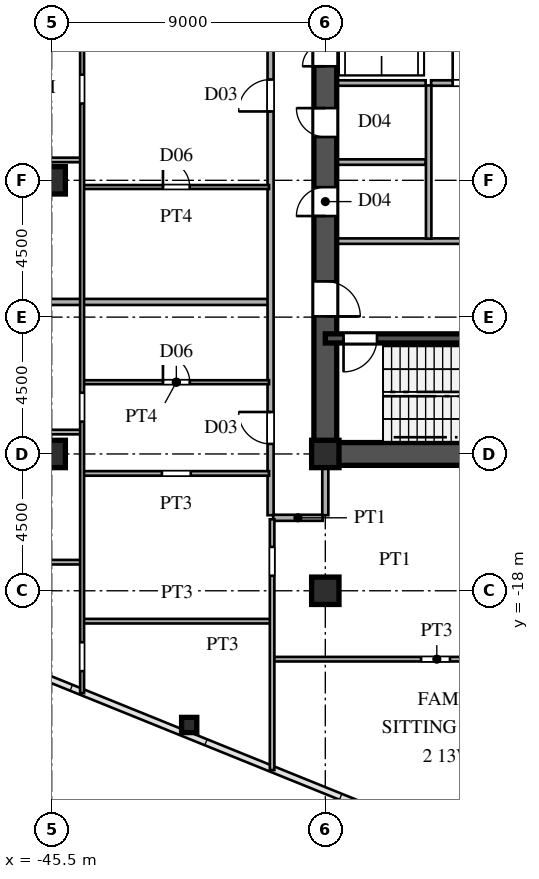
"""IFC4 building model, lengths in metres.
Left out: names, types, materials, properties, quantities, classifications, styles, units other than length and angle.
Written with IfcOpenShell. Run it as: python <this file> out.ifc"""

import sys

from ifc_helpers import new_model, si_unit, direction, frame, frame_2d, origin, origin_2d, place, context, subcontext, project, spatial, rectangle, hollow_rectangle, i_section, extrude, source, transform, mapped, element, fill, save


model = new_model("IFC4")
c1 = context("Model", 3, precision=1e-05, world=origin(), true_north=direction((0.0, 1.0)))
c2 = subcontext(c1, "Body", "Model", "MODEL_VIEW")
j1 = project(units=[si_unit("LENGTHUNIT", "METRE"), si_unit("PLANEANGLEUNIT", "RADIAN")], contexts=[c1])
p1 = place(None, origin())
s1 = spatial("IfcSite", under=j1, at=p1, CompositionType="ELEMENT")
p2 = place(p1, origin())
s2 = spatial("IfcBuilding", under=s1, at=p2, CompositionType="ELEMENT")
p3 = place(p2, frame((0.0, 0.0, 51.3)))
s3 = spatial("IfcBuildingStorey", under=s2, at=p3, CompositionType="ELEMENT", Elevation=51.3)
m1 = source(origin(), c2, "Body", "SweptSolid", [
    extrude(i_section(OverallWidth=0.9, OverallDepth=0.9, WebThickness=0.036, FlangeThickness=0.055, at=origin_2d()), origin(), (0.0, 0.0, 1.0), 3.6),
])
for number, where, z_axis, x_axis in (
    (1, (-36.5, -18.0, 0.0), (0.0, 0.0, 1.0), (1.0, 0.0, 0.0)),
    (2, (-36.5, -13.5, 0.0), (0.0, 0.0, 1.0), (1.0, 0.0, 0.0)),
    (3, (-45.5, -13.5, 0.0), (0.0, 0.0, 1.0), (1.0, 0.0, 0.0)),
    (4, (-45.5, -4.5, 0.0), (0.0, 0.0, 1.0), (1.0, 0.0, 0.0)),
):
    element("IfcColumn", number, at=place(p3, frame(where, z_axis=z_axis, x_axis=x_axis)), inside=s3, PredefinedType="COLUMN", context=c2, shape_type="MappedRepresentation", body=[
        mapped(m1, transform((0.0, 0.0, 0.0), scale=1.0)),
    ])
m2 = source(origin(), c2, "Body", "SweptSolid", [
    extrude(hollow_rectangle(XDim=0.5, YDim=0.5, WallThickness=0.02, at=origin_2d()), origin(), (0.0, 0.0, 1.0), 3.6),
])
p4 = place(p3, frame((-40.977, -22.414, 0.0), z_axis=(0.0, 0.0, 1.0), x_axis=(1.0, 0.0, 0.0)))
e5 = element("IfcColumn", 5, at=p4, inside=s3, PredefinedType="COLUMN", context=c2, shape_type="MappedRepresentation", body=[
    mapped(m2, transform((0.0, 0.0, 0.0), scale=1.0)),
])
p5 = place(p3, frame((-36.5, -13.5, 0.0), z_axis=(0.0, 0.0, 1.0), x_axis=(1.0, 0.0, 0.0)))
e6 = element("IfcWall", 6, at=p5, inside=s3, PredefinedType="SHEAR", context=c2, shape_type="SweptSolid", body=[
    extrude(rectangle(XDim=9.0, YDim=0.75, at=frame_2d((4.5, 0.0))), origin(), (0.0, 0.0, 1.0), 3.38),
])
p6 = place(p3, frame((-36.5, -13.65, 0.0), z_axis=(0.0, 0.0, 1.0), x_axis=(0.0, 1.0, 0.0)))
e7 = element("IfcWall", 7, at=p6, inside=s3, PredefinedType="SHEAR", context=c2, shape_type="SweptSolid", body=[
    extrude(rectangle(XDim=7.15, YDim=0.75, at=frame_2d((3.575, 0.0))), origin(), (0.0, 0.0, 1.0), 3.38),
])
p7 = place(p6, frame((4.675, 0.0, 0.0)))
e8 = element("IfcOpeningElement", 8, at=p7, cuts=e7, PredefinedType="OPENING", context=c2, shape_type="SweptSolid", body=[
    extrude(rectangle(XDim=1.15, YDim=2.2, at=frame_2d((0.575, 1.1))), frame((0.0, 0.385, 0.0), z_axis=(0.0, -1.0, 0.0), x_axis=(1.0, 0.0, 0.0)), (0.0, 0.0, 1.0), 0.77),
])
p8 = place(p3, frame((-36.5, -1.3, 0.0), z_axis=(0.0, 0.0, 1.0), x_axis=(0.0, 1.0, 0.0)))
e9 = element("IfcWall", 9, at=p8, inside=s3, PredefinedType="SHEAR", context=c2, shape_type="SweptSolid", body=[
    extrude(rectangle(XDim=2.6, YDim=0.75, at=frame_2d((1.3, 0.0))), origin(), (0.0, 0.0, 1.0), 3.38),
])
p9 = place(p8, frame((0.55, 0.0, 0.0)))
e10 = element("IfcOpeningElement", 10, at=p9, cuts=e9, PredefinedType="OPENING", context=c2, shape_type="SweptSolid", body=[
    extrude(rectangle(XDim=1.5, YDim=2.3, at=frame_2d((0.75, 1.15))), frame((0.0, 0.385, 0.0), z_axis=(0.0, -1.0, 0.0), x_axis=(1.0, 0.0, 0.0)), (0.0, 0.0, 1.0), 0.77),
])
p10 = place(p3, frame((-36.5, -6.5, 0.0), z_axis=(0.0, 0.0, 1.0), x_axis=(0.0, 1.0, 0.0)))
e11 = element("IfcWall", 11, at=p10, inside=s3, PredefinedType="SHEAR", context=c2, shape_type="SweptSolid", body=[
    extrude(rectangle(XDim=2.6, YDim=0.75, at=frame_2d((1.3, 0.0))), origin(), (0.0, 0.0, 1.0), 3.38),
])
p11 = place(p10, frame((0.825, 0.0, 0.0)))
e12 = element("IfcOpeningElement", 12, at=p11, cuts=e11, PredefinedType="OPENING", context=c2, shape_type="SweptSolid", body=[
    extrude(rectangle(XDim=0.95, YDim=2.15, at=frame_2d((0.475, 1.075))), frame((0.0, 0.385, 0.0), z_axis=(0.0, -1.0, 0.0), x_axis=(1.0, 0.0, 0.0)), (0.0, 0.0, 1.0), 0.77),
])
p12 = place(p3, frame((-36.5, -3.9, 0.0), z_axis=(0.0, 0.0, 1.0), x_axis=(0.0, 1.0, 0.0)))
e13 = element("IfcWall", 13, at=p12, inside=s3, PredefinedType="SHEAR", context=c2, shape_type="SweptSolid", body=[
    extrude(rectangle(XDim=2.6, YDim=0.75, at=frame_2d((1.3, 0.0))), origin(), (0.0, 0.0, 1.0), 3.38),
])
p13 = place(p12, frame((0.825, 0.0, 0.0)))
e14 = element("IfcOpeningElement", 14, at=p13, cuts=e13, PredefinedType="OPENING", context=c2, shape_type="SweptSolid", body=[
    extrude(rectangle(XDim=0.95, YDim=2.15, at=frame_2d((0.475, 1.075))), frame((0.0, 0.385, 0.0), z_axis=(0.0, -1.0, 0.0), x_axis=(1.0, 0.0, 0.0)), (0.0, 0.0, 1.0), 0.77),
])
p14 = place(p3, frame((-36.5, -9.7, 0.0), z_axis=(0.0, 0.0, 1.0), x_axis=(1.0, 0.0, 0.0)))
e15 = element("IfcWall", 15, at=p14, inside=s3, PredefinedType="SHEAR", context=c2, shape_type="SweptSolid", body=[
    extrude(rectangle(XDim=9.0, YDim=0.3, at=frame_2d((4.5, 0.0))), origin(), (0.0, 0.0, 1.0), 3.38),
])
p15 = place(p14, frame((0.6, 0.0, 0.0)))
e16 = element("IfcOpeningElement", 16, at=p15, cuts=e15, PredefinedType="OPENING", context=c2, shape_type="SweptSolid", body=[
    extrude(rectangle(XDim=1.1, YDim=2.2, at=frame_2d((0.55, 1.1))), frame((0.0, 0.16, 0.0), z_axis=(0.0, -1.0, 0.0), x_axis=(1.0, 0.0, 0.0)), (0.0, 0.0, 1.0), 0.32),
])
p16 = place(p3, frame((-36.15, -6.5, 0.0), z_axis=(0.0, 0.0, 1.0), x_axis=(1.0, 0.0, 0.0)))
e17 = element("IfcWall", 17, at=p16, inside=s3, PredefinedType="PARTITIONING", context=c2, shape_type="SweptSolid", body=[
    extrude(rectangle(XDim=5.7, YDim=0.18, at=frame_2d((2.85, 0.0))), origin(), (0.0, 0.0, 1.0), 3.38),
])
p17 = place(p3, frame((-33.1, -6.42, 0.0), z_axis=(0.0, 0.0, 1.0), x_axis=(0.0, 1.0, 0.0)))
e18 = element("IfcWall", 18, at=p17, inside=s3, PredefinedType="PARTITIONING", context=c2, shape_type="SweptSolid", body=[
    extrude(rectangle(XDim=5.04, YDim=0.18, at=frame_2d((2.52, 0.0))), origin(), (0.0, 0.0, 1.0), 3.38),
])
p18 = place(p3, frame((-33.02, -1.3, 0.0), z_axis=(0.0, 0.0, 1.0), x_axis=(1.0, 0.0, 0.0)))
e19 = element("IfcWall", 19, at=p18, inside=s3, PredefinedType="PARTITIONING", context=c2, shape_type="SweptSolid", body=[
    extrude(rectangle(XDim=2.57, YDim=0.18, at=frame_2d((1.285, 0.0))), origin(), (0.0, 0.0, 1.0), 3.38),
])
p19 = place(p18, frame((0.71, 0.0, 0.0)))
e20 = element("IfcOpeningElement", 20, at=p19, cuts=e19, PredefinedType="OPENING", context=c2, shape_type="SweptSolid", body=[
    extrude(rectangle(XDim=1.15, YDim=2.2, at=frame_2d((0.575, 1.1))), frame((0.0, 0.1, 0.0), z_axis=(0.0, -1.0, 0.0), x_axis=(1.0, 0.0, 0.0)), (0.0, 0.0, 1.0), 0.2),
])
for number, where, z_axis, x_axis in (
    (21, (-36.15, -1.3, 0.0), (0.0, 0.0, 1.0), (1.0, 0.0, 0.0)),
    (22, (-36.15, -3.9, 0.0), (0.0, 0.0, 1.0), (1.0, 0.0, 0.0)),
):
    element("IfcWall", number, at=place(p3, frame(where, z_axis=z_axis, x_axis=x_axis)), inside=s3, PredefinedType="PARTITIONING", context=c2, shape_type="SweptSolid", body=[
        extrude(rectangle(XDim=2.95, YDim=0.18, at=frame_2d((1.475, 0.0))), origin(), (0.0, 0.0, 1.0), 3.38),
    ])
p20 = place(p3, frame((-38.2, -20.25, 0.0), z_axis=(0.0, 0.0, 1.0), x_axis=(1.0, 0.0, 0.0)))
e23 = element("IfcWall", 23, at=p20, inside=s3, PredefinedType="PARTITIONING", context=c2, shape_type="SweptSolid", body=[
    extrude(rectangle(XDim=10.735, YDim=0.15, at=frame_2d((5.367, 0.0))), origin(), (0.0, 0.0, 1.0), 3.38),
])
p21 = place(p20, frame((4.85, 0.0, 0.0)))
e24 = element("IfcOpeningElement", 24, at=p21, cuts=e23, PredefinedType="OPENING", context=c2, shape_type="SweptSolid", body=[
    extrude(rectangle(XDim=0.95, YDim=2.15, at=frame_2d((0.475, 1.075))), frame((0.0, 0.085, 0.0), z_axis=(0.0, -1.0, 0.0), x_axis=(1.0, 0.0, 0.0)), (0.0, 0.0, 1.0), 0.17),
])
p22 = place(p3, frame((-44.45, -19.0, 0.0), z_axis=(0.0, 0.0, 1.0), x_axis=(1.0, 0.0, 0.0)))
e25 = element("IfcWall", 25, at=p22, inside=s3, PredefinedType="PARTITIONING", context=c2, shape_type="SweptSolid", body=[
    extrude(rectangle(XDim=6.15, YDim=0.15, at=frame_2d((3.075, 0.0))), origin(), (0.0, 0.0, 1.0), 3.38),
])
p23 = place(p3, frame((-54.45, -17.06, 0.0), z_axis=(0.0, 0.0, 1.0), x_axis=(1.0, 0.0, 0.0)))
e26 = element("IfcWall", 26, at=p23, inside=s3, PredefinedType="PARTITIONING", context=c2, shape_type="SweptSolid", body=[
    extrude(rectangle(XDim=9.9, YDim=0.15, at=frame_2d((4.95, 0.0))), origin(), (0.0, 0.0, 1.0), 3.38),
])
p24 = place(p23, frame((4.475, 0.0, 0.0)))
e27 = element("IfcOpeningElement", 27, at=p24, cuts=e26, PredefinedType="OPENING", context=c2, shape_type="SweptSolid", body=[
    extrude(rectangle(XDim=0.95, YDim=2.15, at=frame_2d((0.475, 1.075))), frame((0.0, 0.085, 0.0), z_axis=(0.0, -1.0, 0.0), x_axis=(1.0, 0.0, 0.0)), (0.0, 0.0, 1.0), 0.17),
])
p25 = place(p3, frame((-38.215, -15.6, 0.0), z_axis=(0.0, 0.0, 1.0), x_axis=(1.0, 0.0, 0.0)))
e28 = element("IfcWall", 28, at=p25, inside=s3, PredefinedType="PARTITIONING", context=c2, shape_type="SweptSolid", body=[
    extrude(rectangle(XDim=1.63, YDim=0.2, at=frame_2d((0.815, 0.0))), origin(), (0.0, 0.0, 1.0), 3.38),
])
p26 = place(p3, frame((-44.45, -14.14, 0.0), z_axis=(0.0, 0.0, 1.0), x_axis=(1.0, 0.0, 0.0)))
e29 = element("IfcWall", 29, at=p26, inside=s3, PredefinedType="PARTITIONING", context=c2, shape_type="SweptSolid", body=[
    extrude(rectangle(XDim=6.1, YDim=0.15, at=frame_2d((3.05, 0.0))), origin(), (0.0, 0.0, 1.0), 3.38),
])
p27 = place(p26, frame((2.575, 0.0, 0.0)))
e30 = element("IfcOpeningElement", 30, at=p27, cuts=e29, PredefinedType="OPENING", context=c2, shape_type="SweptSolid", body=[
    extrude(rectangle(XDim=0.95, YDim=2.15, at=frame_2d((0.475, 1.075))), frame((0.0, 0.085, 0.0), z_axis=(0.0, -1.0, 0.0), x_axis=(1.0, 0.0, 0.0)), (0.0, 0.0, 1.0), 0.17),
])
p28 = place(p3, frame((-65.672, -12.78, 0.0), z_axis=(0.0, 0.0, 1.0), x_axis=(1.0, 0.0, 0.0)))
e31 = element("IfcWall", 31, at=p28, inside=s3, PredefinedType="PARTITIONING", context=c2, shape_type="SweptSolid", body=[
    extrude(rectangle(XDim=21.122, YDim=0.15, at=frame_2d((10.561, 0.0))), origin(), (0.0, 0.0, 1.0), 3.38),
])
p29 = place(p28, frame((15.697, 0.0, 0.0)))
e32 = element("IfcOpeningElement", 32, at=p29, cuts=e31, PredefinedType="OPENING", context=c2, shape_type="SweptSolid", body=[
    extrude(rectangle(XDim=0.95, YDim=2.15, at=frame_2d((0.475, 1.075))), frame((0.0, 0.085, 0.0), z_axis=(0.0, -1.0, 0.0), x_axis=(1.0, 0.0, 0.0)), (0.0, 0.0, 1.0), 0.17),
])
p30 = place(p28, frame((7.847, 0.0, 0.0)))
e33 = element("IfcOpeningElement", 33, at=p30, cuts=e31, PredefinedType="OPENING", context=c2, shape_type="SweptSolid", body=[
    extrude(rectangle(XDim=0.95, YDim=2.15, at=frame_2d((0.475, 1.075))), frame((0.0, 0.085, 0.0), z_axis=(0.0, -1.0, 0.0), x_axis=(1.0, 0.0, 0.0)), (0.0, 0.0, 1.0), 0.17),
])
p31 = place(p3, frame((-44.45, -11.14, 0.0), z_axis=(0.0, 0.0, 1.0), x_axis=(1.0, 0.0, 0.0)))
e34 = element("IfcWall", 34, at=p31, inside=s3, PredefinedType="PARTITIONING", context=c2, shape_type="SweptSolid", body=[
    extrude(rectangle(XDim=6.1, YDim=0.13, at=frame_2d((3.05, 0.0))), origin(), (0.0, 0.0, 1.0), 3.38),
])
p32 = place(p31, frame((2.61, 0.0, 0.0)))
e35 = element("IfcOpeningElement", 35, at=p32, cuts=e34, PredefinedType="OPENING", context=c2, shape_type="SweptSolid", body=[
    extrude(rectangle(XDim=0.88, YDim=2.1, at=frame_2d((0.44, 1.05))), frame((0.0, 0.075, 0.0), z_axis=(0.0, -1.0, 0.0), x_axis=(1.0, 0.0, 0.0)), (0.0, 0.0, 1.0), 0.15),
])
p33 = place(p3, frame((-72.505, -8.5, 0.0), z_axis=(0.0, 0.0, 1.0), x_axis=(1.0, 0.0, 0.0)))
e36 = element("IfcWall", 36, at=p33, inside=s3, PredefinedType="PARTITIONING", context=c2, shape_type="SweptSolid", body=[
    extrude(rectangle(XDim=34.125, YDim=0.2, at=frame_2d((17.062, 0.0))), origin(), (0.0, 0.0, 1.0), 3.38),
])
p34 = place(p3, frame((-44.45, -4.72, 0.0), z_axis=(0.0, 0.0, 1.0), x_axis=(1.0, 0.0, 0.0)))
e37 = element("IfcWall", 37, at=p34, inside=s3, PredefinedType="PARTITIONING", context=c2, shape_type="SweptSolid", body=[
    extrude(rectangle(XDim=6.1, YDim=0.13, at=frame_2d((3.05, 0.0))), origin(), (0.0, 0.0, 1.0), 3.38),
])
p35 = place(p34, frame((2.61, 0.0, 0.0)))
e38 = element("IfcOpeningElement", 38, at=p35, cuts=e37, PredefinedType="OPENING", context=c2, shape_type="SweptSolid", body=[
    extrude(rectangle(XDim=0.88, YDim=2.1, at=frame_2d((0.44, 1.05))), frame((0.0, 0.075, 0.0), z_axis=(0.0, -1.0, 0.0), x_axis=(1.0, 0.0, 0.0)), (0.0, 0.0, 1.0), 0.15),
])
p36 = place(p3, frame((-72.535, -3.83, 0.0), z_axis=(0.0, 0.0, 1.0), x_axis=(1.0, 0.0, 0.0)))
e39 = element("IfcWall", 39, at=p36, inside=s3, PredefinedType="PARTITIONING", context=c2, shape_type="SweptSolid", body=[
    extrude(rectangle(XDim=27.985, YDim=0.15, at=frame_2d((13.992, 0.0))), origin(), (0.0, 0.0, 1.0), 3.38),
])
p37 = place(p36, frame((22.56, 0.0, 0.0)))
e40 = element("IfcOpeningElement", 40, at=p37, cuts=e39, PredefinedType="OPENING", context=c2, shape_type="SweptSolid", body=[
    extrude(rectangle(XDim=0.95, YDim=2.15, at=frame_2d((0.475, 1.075))), frame((0.0, 0.085, 0.0), z_axis=(0.0, -1.0, 0.0), x_axis=(1.0, 0.0, 0.0)), (0.0, 0.0, 1.0), 0.17),
])
p38 = place(p36, frame((14.71, 0.0, 0.0)))
e41 = element("IfcOpeningElement", 41, at=p38, cuts=e39, PredefinedType="OPENING", context=c2, shape_type="SweptSolid", body=[
    extrude(rectangle(XDim=0.95, YDim=2.15, at=frame_2d((0.475, 1.075))), frame((0.0, 0.085, 0.0), z_axis=(0.0, -1.0, 0.0), x_axis=(1.0, 0.0, 0.0)), (0.0, 0.0, 1.0), 0.17),
])
p39 = place(p3, frame((-44.5, -21.368, 0.0), z_axis=(0.0, 0.0, 1.0), x_axis=(0.0, 1.0, 0.0)))
e42 = element("IfcWall", 42, at=p39, inside=s3, PredefinedType="PARTITIONING", context=c2, shape_type="SweptSolid", body=[
    extrude(rectangle(XDim=22.151, YDim=0.13, at=frame_2d((11.075, 0.0))), origin(), (0.0, 0.0, 1.0), 3.38),
])
p40 = place(p39, frame((8.932, 0.0, 0.0)))
e43 = element("IfcOpeningElement", 43, at=p40, cuts=e42, PredefinedType="OPENING", context=c2, shape_type="SweptSolid", body=[
    extrude(rectangle(XDim=0.95, YDim=2.15, at=frame_2d((0.475, 1.075))), frame((0.0, 0.075, 0.0), z_axis=(0.0, -1.0, 0.0), x_axis=(1.0, 0.0, 0.0)), (0.0, 0.0, 1.0), 0.15),
])
p41 = place(p39, frame((0.724, 0.0, 0.0)))
e44 = element("IfcOpeningElement", 44, at=p41, cuts=e42, PredefinedType="OPENING", context=c2, shape_type="SweptSolid", body=[
    extrude(rectangle(XDim=0.95, YDim=2.15, at=frame_2d((0.475, 1.075))), frame((0.0, 0.075, 0.0), z_axis=(0.0, -1.0, 0.0), x_axis=(1.0, 0.0, 0.0)), (0.0, 0.0, 1.0), 0.15),
])
p42 = place(p39, frame((19.393, 0.0, 0.0)))
e45 = element("IfcOpeningElement", 45, at=p42, cuts=e42, PredefinedType="OPENING", context=c2, shape_type="SweptSolid", body=[
    extrude(rectangle(XDim=0.95, YDim=2.15, at=frame_2d((0.475, 1.075))), frame((0.0, 0.075, 0.0), z_axis=(0.0, -1.0, 0.0), x_axis=(1.0, 0.0, 0.0)), (0.0, 0.0, 1.0), 0.15),
])
p43 = place(p3, frame((-38.3, -15.515, 0.0), z_axis=(0.0, 0.0, 1.0), x_axis=(0.0, 1.0, 0.0)))
e46 = element("IfcWall", 46, at=p43, inside=s3, PredefinedType="PARTITIONING", context=c2, shape_type="SweptSolid", body=[
    extrude(rectangle(XDim=31.03, YDim=0.2, at=frame_2d((15.515, 0.0))), origin(), (0.0, 0.0, 1.0), 3.38),
])
p44 = place(p43, frame((2.345, 0.0, 0.0)))
e47 = element("IfcOpeningElement", 47, at=p44, cuts=e46, PredefinedType="OPENING", context=c2, shape_type="SweptSolid", body=[
    extrude(rectangle(XDim=1.05, YDim=2.25, at=frame_2d((0.525, 1.125))), frame((0.0, 0.11, 0.0), z_axis=(0.0, -1.0, 0.0), x_axis=(1.0, 0.0, 0.0)), (0.0, 0.0, 1.0), 0.22),
])
p45 = place(p43, frame((13.28, 0.0, 0.0)))
e48 = element("IfcOpeningElement", 48, at=p45, cuts=e46, PredefinedType="OPENING", context=c2, shape_type="SweptSolid", body=[
    extrude(rectangle(XDim=1.05, YDim=2.25, at=frame_2d((0.525, 1.125))), frame((0.0, 0.11, 0.0), z_axis=(0.0, -1.0, 0.0), x_axis=(1.0, 0.0, 0.0)), (0.0, 0.0, 1.0), 0.22),
])
p46 = place(p43, frame((25.567, 0.0, 0.0)))
e49 = element("IfcOpeningElement", 49, at=p46, cuts=e46, PredefinedType="OPENING", context=c2, shape_type="SweptSolid", body=[
    extrude(rectangle(XDim=1.05, YDim=2.25, at=frame_2d((0.525, 1.125))), frame((0.0, 0.11, 0.0), z_axis=(0.0, -1.0, 0.0), x_axis=(1.0, 0.0, 0.0)), (0.0, 0.0, 1.0), 0.22),
])
p47 = place(p3, frame((-38.25, -23.898, 0.0), z_axis=(0.0, 0.0, 1.0), x_axis=(0.0, 1.0, 0.0)))
e50 = element("IfcWall", 50, at=p47, inside=s3, PredefinedType="PARTITIONING", context=c2, shape_type="SweptSolid", body=[
    extrude(rectangle(XDim=8.248, YDim=0.15, at=frame_2d((4.124, 0.0))), origin(), (0.0, 0.0, 1.0), 3.38),
])
p48 = place(p47, frame((6.391, 0.0, 0.0)))
e51 = element("IfcOpeningElement", 51, at=p48, cuts=e50, PredefinedType="OPENING", context=c2, shape_type="SweptSolid", body=[
    extrude(rectangle(XDim=0.95, YDim=2.15, at=frame_2d((0.475, 1.075))), frame((0.0, 0.085, 0.0), z_axis=(0.0, -1.0, 0.0), x_axis=(1.0, 0.0, 0.0)), (0.0, 0.0, 1.0), 0.17),
])
p49 = place(p3, frame((-36.5, -15.515, 0.0), z_axis=(0.0, 0.0, 1.0), x_axis=(0.0, 1.0, 0.0)))
e52 = element("IfcWall", 52, at=p49, inside=s3, PredefinedType="PARTITIONING", context=c2, shape_type="SweptSolid", body=[
    extrude(rectangle(XDim=1.635, YDim=0.2, at=frame_2d((0.817, 0.0))), origin(), (0.0, 0.0, 1.0), 2.68),
])
m3 = source(origin(), c2, "Body", "SweptSolid", [
    extrude(rectangle(XDim=1.15, YDim=2.2, at=frame_2d((0.575, 1.1))), frame((0.0, 0.025, 0.0), z_axis=(0.0, -1.0, 0.0), x_axis=(1.0, 0.0, 0.0)), (0.0, 0.0, 1.0), 0.05),
])
p50 = place(p7, frame((1.15, 0.0, 0.0), z_axis=(0.0, 0.0, 1.0), x_axis=(-1.0, 0.0, 0.0)))
e53 = element("IfcDoor", 53, at=p50, inside=s3, OperationType="SINGLE_SWING_LEFT", PredefinedType="DOOR", context=c2, shape_type="MappedRepresentation", body=[
    mapped(m3, transform((0.0, 0.0, 0.0), scale=1.0)),
])
fill(e8, e53)
m4 = source(origin(), c2, "Body", "SweptSolid", [
    extrude(rectangle(XDim=1.5, YDim=2.3, at=frame_2d((0.75, 1.15))), frame((0.0, 0.025, 0.0), z_axis=(0.0, -1.0, 0.0), x_axis=(1.0, 0.0, 0.0)), (0.0, 0.0, 1.0), 0.05),
])
p51 = place(p9, origin())
e54 = element("IfcDoor", 54, at=p51, inside=s3, OperationType="DOUBLE_SWING_LEFT", PredefinedType="DOOR", context=c2, shape_type="MappedRepresentation", body=[
    mapped(m4, transform((0.0, 0.0, 0.0), scale=1.0)),
])
fill(e10, e54)
m5 = source(origin(), c2, "Body", "SweptSolid", [
    extrude(rectangle(XDim=0.95, YDim=2.15, at=frame_2d((0.475, 1.075))), frame((0.0, 0.025, 0.0), z_axis=(0.0, -1.0, 0.0), x_axis=(1.0, 0.0, 0.0)), (0.0, 0.0, 1.0), 0.05),
])
p52 = place(p11, origin())
e55 = element("IfcDoor", 55, at=p52, inside=s3, OperationType="SINGLE_SWING_LEFT", PredefinedType="DOOR", context=c2, shape_type="MappedRepresentation", body=[
    mapped(m5, transform((0.0, 0.0, 0.0), scale=1.0)),
])
fill(e12, e55)
p53 = place(p13, origin())
e56 = element("IfcDoor", 56, at=p53, inside=s3, OperationType="SINGLE_SWING_RIGHT", PredefinedType="DOOR", context=c2, shape_type="MappedRepresentation", body=[
    mapped(m5, transform((0.0, 0.0, 0.0), scale=1.0)),
])
fill(e14, e56)
m6 = source(origin(), c2, "Body", "SweptSolid", [
    extrude(rectangle(XDim=1.1, YDim=2.2, at=frame_2d((0.55, 1.1))), frame((0.0, 0.025, 0.0), z_axis=(0.0, -1.0, 0.0), x_axis=(1.0, 0.0, 0.0)), (0.0, 0.0, 1.0), 0.05),
])
p54 = place(p15, frame((1.1, 0.0, 0.0), z_axis=(0.0, 0.0, 1.0), x_axis=(-1.0, 0.0, 0.0)))
e57 = element("IfcDoor", 57, at=p54, inside=s3, OperationType="SINGLE_SWING_LEFT", PredefinedType="DOOR", context=c2, shape_type="MappedRepresentation", body=[
    mapped(m6, transform((0.0, 0.0, 0.0), scale=1.0)),
])
fill(e16, e57)
p55 = place(p19, origin())
e58 = element("IfcDoor", 58, at=p55, inside=s3, OperationType="SINGLE_SWING_LEFT", PredefinedType="DOOR", context=c2, shape_type="MappedRepresentation", body=[
    mapped(m3, transform((0.0, 0.0, 0.0), scale=1.0)),
])
fill(e20, e58)
m7 = source(origin(), c2, "Body", "SweptSolid", [
    extrude(rectangle(XDim=0.88, YDim=2.1, at=frame_2d((0.44, 1.05))), frame((0.0, 0.025, 0.0), z_axis=(0.0, -1.0, 0.0), x_axis=(1.0, 0.0, 0.0)), (0.0, 0.0, 1.0), 0.05),
])
p56 = place(p32, origin())
e59 = element("IfcDoor", 59, at=p56, inside=s3, OperationType="SINGLE_SWING_LEFT", PredefinedType="DOOR", context=c2, shape_type="MappedRepresentation", body=[
    mapped(m7, transform((0.0, 0.0, 0.0), scale=1.0)),
])
fill(e35, e59)
p57 = place(p35, origin())
e60 = element("IfcDoor", 60, at=p57, inside=s3, OperationType="SINGLE_SWING_LEFT", PredefinedType="DOOR", context=c2, shape_type="MappedRepresentation", body=[
    mapped(m7, transform((0.0, 0.0, 0.0), scale=1.0)),
])
fill(e38, e60)
m8 = source(origin(), c2, "Body", "SweptSolid", [
    extrude(rectangle(XDim=1.05, YDim=2.25, at=frame_2d((0.525, 1.125))), frame((0.0, 0.025, 0.0), z_axis=(0.0, -1.0, 0.0), x_axis=(1.0, 0.0, 0.0)), (0.0, 0.0, 1.0), 0.05),
])
p58 = place(p44, origin())
e61 = element("IfcDoor", 61, at=p58, inside=s3, OperationType="SINGLE_SWING_RIGHT", PredefinedType="DOOR", context=c2, shape_type="MappedRepresentation", body=[
    mapped(m8, transform((0.0, 0.0, 0.0), scale=1.0)),
])
fill(e47, e61)
p59 = place(p45, origin())
e62 = element("IfcDoor", 62, at=p59, inside=s3, OperationType="SINGLE_SWING_LEFT", PredefinedType="DOOR", context=c2, shape_type="MappedRepresentation", body=[
    mapped(m8, transform((0.0, 0.0, 0.0), scale=1.0)),
])
fill(e48, e62)
save(model, sys.argv[1])
